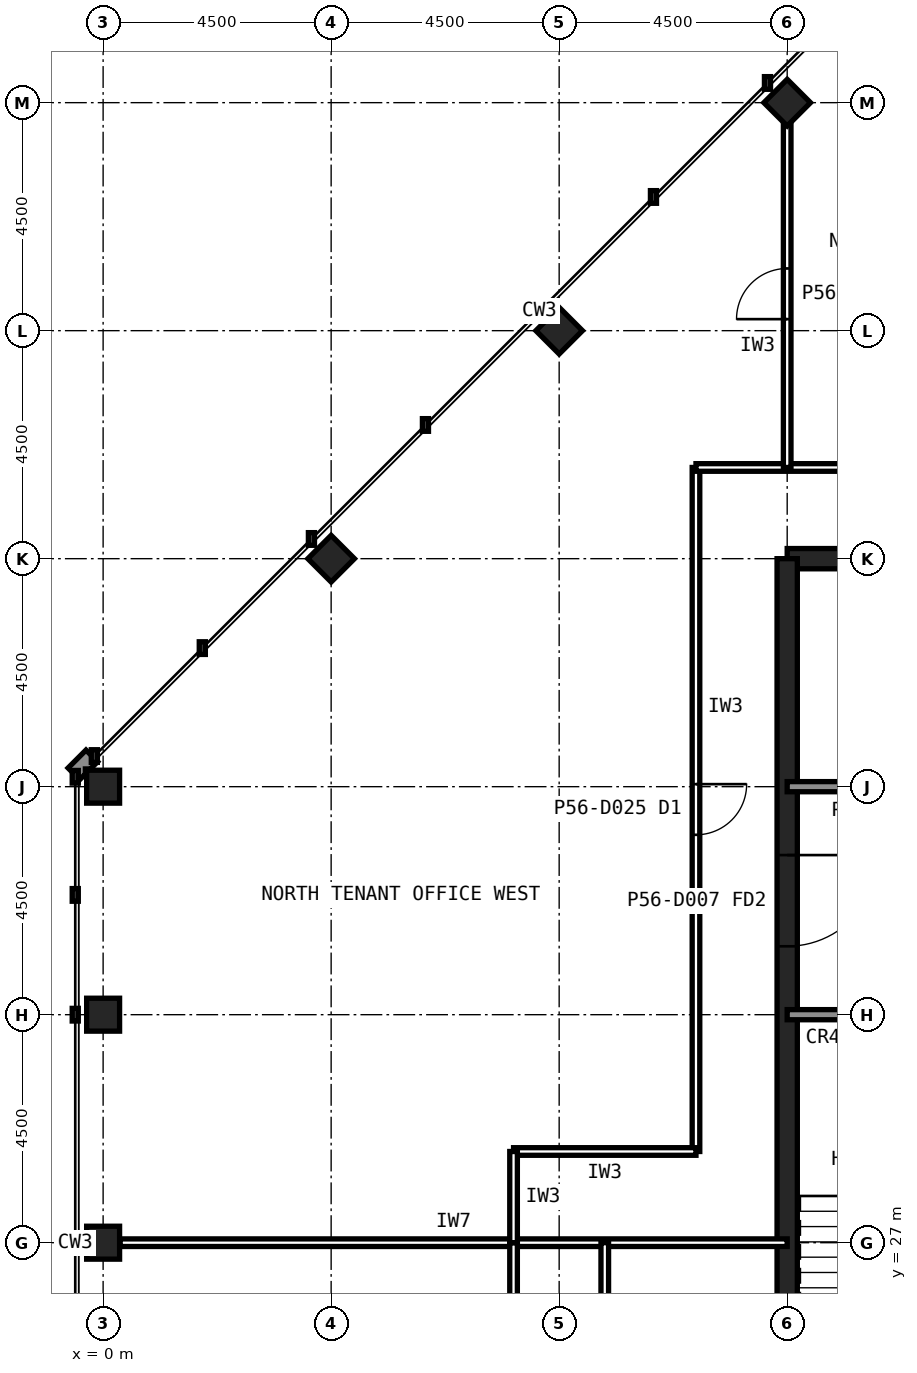
"""IFC4 building model, lengths in metres.
Left out: names, types, materials, properties, quantities, classifications, styles, units other than length and angle.
Written with IfcOpenShell. Run it as: python <this file> out.ifc"""

import sys

from ifc_helpers import new_model, si_unit, direction, frame, frame_2d, origin, origin_2d, place, context, subcontext, project, spatial, rectangle, hollow_rectangle, extrude, element, fill, save


model = new_model("IFC4")
c1 = context("Model", 3, precision=1e-05, world=origin(), true_north=direction((0.0, 1.0)))
c2 = subcontext(c1, "Body", "Model", "MODEL_VIEW")
j1 = project(units=[si_unit("LENGTHUNIT", "METRE"), si_unit("PLANEANGLEUNIT", "RADIAN")], contexts=[c1])
p1 = place(None, origin())
s1 = spatial("IfcSite", under=j1, at=p1, CompositionType="ELEMENT")
p2 = place(p1, origin())
s2 = spatial("IfcBuilding", under=s1, at=p2, CompositionType="ELEMENT")
p3 = place(p2, frame((0.0, 0.0, 238.6)))
s3 = spatial("IfcBuildingStorey", under=s2, at=p3, CompositionType="ELEMENT", Elevation=238.6)
for number, where, z_axis, x_axis in (
    (1, (0.0, 36.0, 0.0), (0.0, 0.0, 1.0), (1.0, 0.0, 0.0)),
    (2, (0.0, 31.5, 0.0), (0.0, 0.0, 1.0), (1.0, 0.0, 0.0)),
    (3, (0.0, 27.0, 0.0), (0.0, 0.0, 1.0), (1.0, 0.0, 0.0)),
    (4, (4.5, 40.5, 0.0), (0.0, 0.0, 1.0), (0.707, 0.707, 0.0)),
    (5, (9.0, 45.0, 0.0), (0.0, 0.0, 1.0), (0.707, 0.707, 0.0)),
    (6, (13.5, 49.5, 0.0), (0.0, 0.0, 1.0), (0.707, 0.707, 0.0)),
):
    element("IfcColumn", number, at=place(p3, frame(where, z_axis=z_axis, x_axis=x_axis)), inside=s3, PredefinedType="COLUMN", context=c2, shape_type="SweptSolid", body=[
        extrude(hollow_rectangle(XDim=0.65, YDim=0.65, WallThickness=0.032, at=origin_2d()), origin(), (0.0, 0.0, 1.0), 4.0),
    ])
p4 = place(p3, frame((40.5, 40.5, 0.0), z_axis=(0.0, 0.0, 1.0), x_axis=(-1.0, 0.0, 0.0)))
e7 = element("IfcWall", 7, at=p4, inside=s3, PredefinedType="SHEAR", context=c2, shape_type="SweptSolid", body=[
    extrude(rectangle(XDim=27.0, YDim=0.4, at=frame_2d((13.5, 0.0))), origin(), (0.0, 0.0, 1.0), 4.0),
])
p5 = place(p3, frame((13.5, 40.5, 0.0), z_axis=(0.0, 0.0, 1.0), x_axis=(0.0, -1.0, 0.0)))
e8 = element("IfcWall", 8, at=p5, inside=s3, PredefinedType="SHEAR", context=c2, shape_type="SweptSolid", body=[
    extrude(rectangle(XDim=27.0, YDim=0.4, at=frame_2d((13.5, 0.0))), origin(), (0.0, 0.0, 1.0), 4.0),
])
p6 = place(p5, frame((19.65, 0.0, 0.0)))
e9 = element("IfcOpeningElement", 9, at=p6, cuts=e8, PredefinedType="OPENING", context=c2, shape_type="SweptSolid", body=[
    extrude(rectangle(XDim=1.2, YDim=2.1, at=frame_2d((0.6, 1.05))), frame((0.0, 0.21, 0.0), z_axis=(0.0, -1.0, 0.0), x_axis=(1.0, 0.0, 0.0)), (0.0, 0.0, 1.0), 0.42),
])
p7 = place(p5, frame((5.85, 0.0, 0.0)))
e10 = element("IfcOpeningElement", 10, at=p7, cuts=e8, PredefinedType="OPENING", context=c2, shape_type="SweptSolid", body=[
    extrude(rectangle(XDim=1.8, YDim=2.1, at=frame_2d((0.9, 1.05))), frame((0.0, 0.21, 0.0), z_axis=(0.0, -1.0, 0.0), x_axis=(1.0, 0.0, 0.0)), (0.0, 0.0, 1.0), 0.42),
])
p8 = place(p3, frame((13.5, 36.0, 0.0), z_axis=(0.0, 0.0, 1.0), x_axis=(1.0, 0.0, 0.0)))
e11 = element("IfcWall", 11, at=p8, inside=s3, PredefinedType="SOLIDWALL", context=c2, shape_type="SweptSolid", body=[
    extrude(rectangle(XDim=27.0, YDim=0.2, at=frame_2d((13.5, 0.0))), origin(), (0.0, 0.0, 1.0), 3.84),
])
p9 = place(p8, frame((1.8, 0.0, 0.0)))
e12 = element("IfcOpeningElement", 12, at=p9, cuts=e11, PredefinedType="OPENING", context=c2, shape_type="SweptSolid", body=[
    extrude(rectangle(XDim=0.9, YDim=2.1, at=frame_2d((0.45, 1.05))), frame((0.0, 0.11, 0.0), z_axis=(0.0, -1.0, 0.0), x_axis=(1.0, 0.0, 0.0)), (0.0, 0.0, 1.0), 0.22),
])
p10 = place(p8, frame((5.55, 0.0, 0.0)))
e13 = element("IfcOpeningElement", 13, at=p10, cuts=e11, PredefinedType="OPENING", context=c2, shape_type="SweptSolid", body=[
    extrude(rectangle(XDim=0.9, YDim=2.1, at=frame_2d((0.45, 1.05))), frame((0.0, 0.11, 0.0), z_axis=(0.0, -1.0, 0.0), x_axis=(1.0, 0.0, 0.0)), (0.0, 0.0, 1.0), 0.22),
])
p11 = place(p8, frame((14.55, 0.0, 0.0)))
e14 = element("IfcOpeningElement", 14, at=p11, cuts=e11, PredefinedType="OPENING", context=c2, shape_type="SweptSolid", body=[
    extrude(rectangle(XDim=0.9, YDim=2.1, at=frame_2d((0.45, 1.05))), frame((0.0, 0.11, 0.0), z_axis=(0.0, -1.0, 0.0), x_axis=(1.0, 0.0, 0.0)), (0.0, 0.0, 1.0), 0.22),
])
p12 = place(p8, frame((17.55, 0.0, 0.0)))
e15 = element("IfcOpeningElement", 15, at=p12, cuts=e11, PredefinedType="OPENING", context=c2, shape_type="SweptSolid", body=[
    extrude(rectangle(XDim=0.9, YDim=2.1, at=frame_2d((0.45, 1.05))), frame((0.0, 0.11, 0.0), z_axis=(0.0, -1.0, 0.0), x_axis=(1.0, 0.0, 0.0)), (0.0, 0.0, 1.0), 0.22),
])
p13 = place(p8, frame((20.55, 0.0, 0.0)))
e16 = element("IfcOpeningElement", 16, at=p13, cuts=e11, PredefinedType="OPENING", context=c2, shape_type="SweptSolid", body=[
    extrude(rectangle(XDim=0.9, YDim=2.1, at=frame_2d((0.45, 1.05))), frame((0.0, 0.11, 0.0), z_axis=(0.0, -1.0, 0.0), x_axis=(1.0, 0.0, 0.0)), (0.0, 0.0, 1.0), 0.22),
])
p14 = place(p8, frame((24.1, 0.0, 0.0)))
e17 = element("IfcOpeningElement", 17, at=p14, cuts=e11, PredefinedType="OPENING", context=c2, shape_type="SweptSolid", body=[
    extrude(rectangle(XDim=1.3, YDim=2.2, at=frame_2d((0.65, 1.1))), frame((0.0, 0.11, 0.0), z_axis=(0.0, -1.0, 0.0), x_axis=(1.0, 0.0, 0.0)), (0.0, 0.0, 1.0), 0.22),
])
p15 = place(p3, frame((13.5, 31.5, 0.0), z_axis=(0.0, 0.0, 1.0), x_axis=(1.0, 0.0, 0.0)))
e18 = element("IfcWall", 18, at=p15, inside=s3, PredefinedType="SOLIDWALL", context=c2, shape_type="SweptSolid", body=[
    extrude(rectangle(XDim=27.0, YDim=0.2, at=frame_2d((13.5, 0.0))), origin(), (0.0, 0.0, 1.0), 3.84),
])
p16 = place(p15, frame((24.15, 0.0, 0.0)))
e19 = element("IfcOpeningElement", 19, at=p16, cuts=e18, PredefinedType="OPENING", context=c2, shape_type="SweptSolid", body=[
    extrude(rectangle(XDim=1.2, YDim=2.1, at=frame_2d((0.6, 1.05))), frame((0.0, 0.11, 0.0), z_axis=(0.0, -1.0, 0.0), x_axis=(1.0, 0.0, 0.0)), (0.0, 0.0, 1.0), 0.22),
])
p17 = place(p15, frame((15.3, 0.0, 0.0)))
e20 = element("IfcOpeningElement", 20, at=p17, cuts=e18, PredefinedType="OPENING", context=c2, shape_type="SweptSolid", body=[
    extrude(rectangle(XDim=0.9, YDim=2.1, at=frame_2d((0.45, 1.05))), frame((0.0, 0.11, 0.0), z_axis=(0.0, -1.0, 0.0), x_axis=(1.0, 0.0, 0.0)), (0.0, 0.0, 1.0), 0.22),
])
p18 = place(p15, frame((19.8, 0.0, 0.0)))
e21 = element("IfcOpeningElement", 21, at=p18, cuts=e18, PredefinedType="OPENING", context=c2, shape_type="SweptSolid", body=[
    extrude(rectangle(XDim=0.9, YDim=2.1, at=frame_2d((0.45, 1.05))), frame((0.0, 0.11, 0.0), z_axis=(0.0, -1.0, 0.0), x_axis=(1.0, 0.0, 0.0)), (0.0, 0.0, 1.0), 0.22),
])
p19 = place(p3, frame((0.335, 27.0, 0.0), z_axis=(0.0, 0.0, 1.0), x_axis=(1.0, 0.0, 0.0)))
e22 = element("IfcWall", 22, at=p19, inside=s3, PredefinedType="PARTITIONING", context=c2, shape_type="SweptSolid", body=[
    extrude(rectangle(XDim=13.165, YDim=0.15, at=frame_2d((6.583, 0.0))), origin(), (0.0, 0.0, 1.0), 2.989),
])
p20 = place(p3, frame((8.1, 27.0, 0.0), z_axis=(0.0, 0.0, 1.0), x_axis=(0.0, -1.0, 0.0)))
e23 = element("IfcWall", 23, at=p20, inside=s3, PredefinedType="PARTITIONING", context=c2, shape_type="SweptSolid", body=[
    extrude(rectangle(XDim=6.3, YDim=0.15, at=frame_2d((3.15, 0.0))), origin(), (0.0, 0.0, 1.0), 3.84),
])
p21 = place(p3, frame((11.7, 42.3, 0.0), z_axis=(0.0, 0.0, 1.0), x_axis=(0.0, -1.0, 0.0)))
e24 = element("IfcWall", 24, at=p21, inside=s3, PredefinedType="PARTITIONING", context=c2, shape_type="SweptSolid", body=[
    extrude(rectangle(XDim=13.5, YDim=0.15, at=frame_2d((6.75, 0.0))), origin(), (0.0, 0.0, 1.0), 3.84),
])
p22 = place(p21, frame((6.25, 0.0, 0.0)))
e25 = element("IfcOpeningElement", 25, at=p22, cuts=e24, PredefinedType="OPENING", context=c2, shape_type="SweptSolid", body=[
    extrude(rectangle(XDim=1.0, YDim=2.1, at=frame_2d((0.5, 1.05))), frame((0.0, 0.085, 0.0), z_axis=(0.0, -1.0, 0.0), x_axis=(1.0, 0.0, 0.0)), (0.0, 0.0, 1.0), 0.17),
])
p23 = place(p3, frame((25.2, 42.3, 0.0), z_axis=(0.0, 0.0, 1.0), x_axis=(-1.0, 0.0, 0.0)))
e26 = element("IfcWall", 26, at=p23, inside=s3, PredefinedType="PARTITIONING", context=c2, shape_type="SweptSolid", body=[
    extrude(rectangle(XDim=13.5, YDim=0.15, at=frame_2d((6.75, 0.0))), origin(), (0.0, 0.0, 1.0), 3.84),
])
p24 = place(p23, frame((6.25, 0.0, 0.0)))
e27 = element("IfcOpeningElement", 27, at=p24, cuts=e26, PredefinedType="OPENING", context=c2, shape_type="SweptSolid", body=[
    extrude(rectangle(XDim=1.0, YDim=2.1, at=frame_2d((0.5, 1.05))), frame((0.0, 0.085, 0.0), z_axis=(0.0, -1.0, 0.0), x_axis=(1.0, 0.0, 0.0)), (0.0, 0.0, 1.0), 0.17),
])
p25 = place(p3, frame((11.7, 28.8, 0.0), z_axis=(0.0, 0.0, 1.0), x_axis=(-1.0, 0.0, 0.0)))
e28 = element("IfcWall", 28, at=p25, inside=s3, PredefinedType="PARTITIONING", context=c2, shape_type="SweptSolid", body=[
    extrude(rectangle(XDim=3.6, YDim=0.15, at=frame_2d((1.8, 0.0))), origin(), (0.0, 0.0, 1.0), 3.84),
])
p26 = place(p3, frame((8.1, 28.8, 0.0), z_axis=(0.0, 0.0, 1.0), x_axis=(0.0, -1.0, 0.0)))
e29 = element("IfcWall", 29, at=p26, inside=s3, PredefinedType="PARTITIONING", context=c2, shape_type="SweptSolid", body=[
    extrude(rectangle(XDim=1.8, YDim=0.15, at=frame_2d((0.9, 0.0))), origin(), (0.0, 0.0, 1.0), 3.84),
])
p27 = place(p3, frame((9.9, 27.0, 0.0), z_axis=(0.0, 0.0, 1.0), x_axis=(0.0, -1.0, 0.0)))
e30 = element("IfcWall", 30, at=p27, inside=s3, PredefinedType="PARTITIONING", context=c2, shape_type="SweptSolid", body=[
    extrude(rectangle(XDim=4.5, YDim=0.15, at=frame_2d((2.25, 0.0))), origin(), (0.0, 0.0, 1.0), 3.84),
])
p28 = place(p3, frame((13.5, 42.3, 0.0), z_axis=(0.0, 0.0, 1.0), x_axis=(0.0, 1.0, 0.0)))
e31 = element("IfcWall", 31, at=p28, inside=s3, PredefinedType="PARTITIONING", context=c2, shape_type="SweptSolid", body=[
    extrude(rectangle(XDim=6.855, YDim=0.15, at=frame_2d((3.427, 0.0))), origin(), (0.0, 0.0, 1.0), 2.989),
])
p29 = place(p28, frame((2.927, 0.0, 0.0)))
e32 = element("IfcOpeningElement", 32, at=p29, cuts=e31, PredefinedType="OPENING", context=c2, shape_type="SweptSolid", body=[
    extrude(rectangle(XDim=1.0, YDim=2.1, at=frame_2d((0.5, 1.05))), frame((0.0, 0.085, 0.0), z_axis=(0.0, -1.0, 0.0), x_axis=(1.0, 0.0, 0.0)), (0.0, 0.0, 1.0), 0.17),
])
p30 = place(p7, origin())
e33 = element("IfcDoor", 33, at=p30, inside=s3, OperationType="SINGLE_SWING_LEFT", PredefinedType="DOOR", context=c2, shape_type="SweptSolid", body=[
    extrude(rectangle(XDim=1.8, YDim=2.1, at=frame_2d((0.9, 1.05))), frame((0.0, 0.025, 0.0), z_axis=(0.0, -1.0, 0.0), x_axis=(1.0, 0.0, 0.0)), (0.0, 0.0, 1.0), 0.05),
])
fill(e10, e33)
p31 = place(p22, origin())
e34 = element("IfcDoor", 34, at=p31, inside=s3, OperationType="SINGLE_SWING_LEFT", PredefinedType="DOOR", context=c2, shape_type="SweptSolid", body=[
    extrude(rectangle(XDim=1.0, YDim=2.1, at=frame_2d((0.5, 1.05))), frame((0.0, 0.025, 0.0), z_axis=(0.0, -1.0, 0.0), x_axis=(1.0, 0.0, 0.0)), (0.0, 0.0, 1.0), 0.05),
])
fill(e25, e34)
p32 = place(p29, origin())
e35 = element("IfcDoor", 35, at=p32, inside=s3, OperationType="SINGLE_SWING_LEFT", PredefinedType="DOOR", context=c2, shape_type="SweptSolid", body=[
    extrude(rectangle(XDim=1.0, YDim=2.1, at=frame_2d((0.5, 1.05))), frame((0.0, 0.025, 0.0), z_axis=(0.0, -1.0, 0.0), x_axis=(1.0, 0.0, 0.0)), (0.0, 0.0, 1.0), 0.05),
])
fill(e32, e35)
save(model, sys.argv[1])
